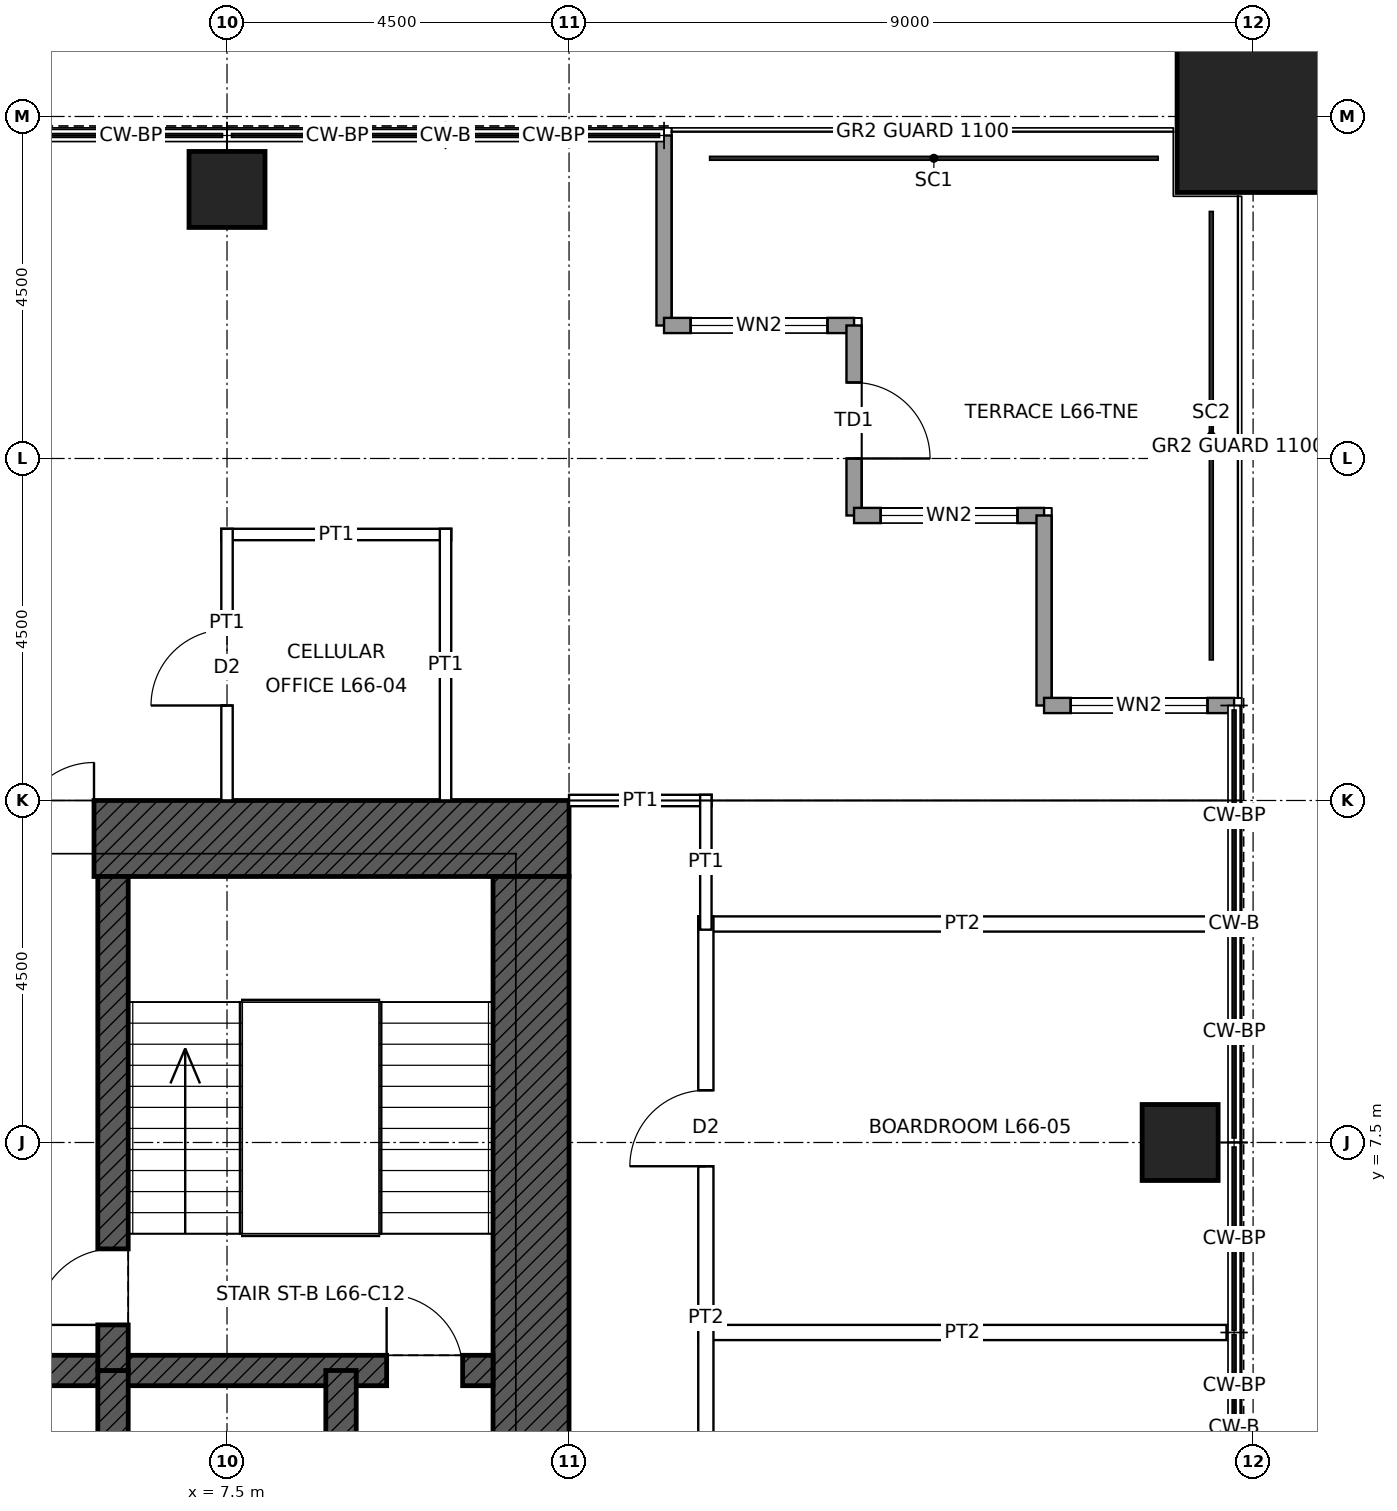
"""IFC4 building model, lengths in metres.
Left out: names, types, materials, properties, quantities, classifications, styles, units other than length and angle.
Written with IfcOpenShell. Run it as: python <this file> out.ifc"""

import sys

from ifc_helpers import new_model, si_unit, direction, frame, frame_2d, origin, origin_2d, place, context, subcontext, project, spatial, rectangle, hollow_rectangle, extrude, element, fill, save


model = new_model("IFC4")
c1 = context("Model", 3, precision=1e-05, world=origin(), true_north=direction((0.0, 1.0)))
c2 = subcontext(c1, "Body", "Model", "MODEL_VIEW")
j1 = project(units=[si_unit("LENGTHUNIT", "METRE"), si_unit("PLANEANGLEUNIT", "RADIAN")], contexts=[c1])
p1 = place(None, origin())
s1 = spatial("IfcSite", under=j1, at=p1, CompositionType="ELEMENT")
p2 = place(p1, origin())
s2 = spatial("IfcBuilding", under=s1, at=p2, CompositionType="ELEMENT")
p3 = place(p2, frame((0.0, 0.0, 299.9)))
s3 = spatial("IfcBuildingStorey", under=s2, at=p3, CompositionType="ELEMENT", Elevation=299.9)
p4 = place(p3, frame((21.0, 21.0, 0.0), z_axis=(0.0, 0.0, 1.0), x_axis=(1.0, 0.0, 0.0)))
e1 = element("IfcColumn", 1, at=p4, inside=s3, PredefinedType="COLUMN", context=c2, shape_type="SweptSolid", body=[
    extrude(hollow_rectangle(XDim=2.0, YDim=2.0, WallThickness=0.095, at=origin_2d()), origin(), (0.0, 0.0, 1.0), 4.0),
])
for number, where, z_axis, x_axis in (
    (2, (7.5, 20.04, 0.0), (0.0, 0.0, 1.0), (1.0, 0.0, 0.0)),
    (3, (20.04, 7.5, 0.0), (0.0, 0.0, 1.0), (1.0, 0.0, 0.0)),
):
    element("IfcColumn", number, at=place(p3, frame(where, z_axis=z_axis, x_axis=x_axis)), inside=s3, PredefinedType="COLUMN", context=c2, shape_type="SweptSolid", body=[
        extrude(hollow_rectangle(XDim=1.0, YDim=1.0, WallThickness=0.075, at=origin_2d()), origin(), (0.0, 0.0, 1.0), 4.0),
    ])
p5 = place(p3, frame((-12.0, 11.5, 0.0), z_axis=(0.0, 0.0, 1.0), x_axis=(1.0, 0.0, 0.0)))
e4 = element("IfcWall", 4, at=p5, inside=s3, PredefinedType="SHEAR", context=c2, shape_type="SweptSolid", body=[
    extrude(rectangle(XDim=24.0, YDim=1.0, at=frame_2d((12.0, 0.0))), origin(), (0.0, 0.0, 1.0), 4.0),
])
p6 = place(p5, frame((6.25, 0.0, 0.0)))
e5 = element("IfcOpeningElement", 5, at=p6, cuts=e4, PredefinedType="OPENING", context=c2, shape_type="SweptSolid", body=[
    extrude(rectangle(XDim=1.0, YDim=2.4, at=frame_2d((0.5, 1.2))), frame((0.0, 0.51, 0.0), z_axis=(0.0, -1.0, 0.0), x_axis=(1.0, 0.0, 0.0)), (0.0, 0.0, 1.0), 1.02),
])
p7 = place(p5, frame((16.75, 0.0, 0.0)))
e6 = element("IfcOpeningElement", 6, at=p7, cuts=e4, PredefinedType="OPENING", context=c2, shape_type="SweptSolid", body=[
    extrude(rectangle(XDim=1.0, YDim=2.4, at=frame_2d((0.5, 1.2))), frame((0.0, 0.51, 0.0), z_axis=(0.0, -1.0, 0.0), x_axis=(1.0, 0.0, 0.0)), (0.0, 0.0, 1.0), 1.02),
])
p8 = place(p3, frame((11.5, 11.0, 0.0), z_axis=(0.0, 0.0, 1.0), x_axis=(0.0, -1.0, 0.0)))
e7 = element("IfcWall", 7, at=p8, inside=s3, PredefinedType="SHEAR", context=c2, shape_type="SweptSolid", body=[
    extrude(rectangle(XDim=22.0, YDim=1.0, at=frame_2d((11.0, 0.0))), origin(), (0.0, 0.0, 1.0), 4.0),
])
p9 = place(p8, frame((10.5, 0.0, 0.0)))
e8 = element("IfcOpeningElement", 8, at=p9, cuts=e7, PredefinedType="OPENING", context=c2, shape_type="SweptSolid", body=[
    extrude(rectangle(XDim=1.0, YDim=2.4, at=frame_2d((0.5, 1.2))), frame((0.0, 0.51, 0.0), z_axis=(0.0, -1.0, 0.0), x_axis=(1.0, 0.0, 0.0)), (0.0, 0.0, 1.0), 1.02),
])
p10 = place(p3, frame((-11.0, 4.5, 0.0), z_axis=(0.0, 0.0, 1.0), x_axis=(1.0, 0.0, 0.0)))
e9 = element("IfcWall", 9, at=p10, inside=s3, PredefinedType="SHEAR", context=c2, shape_type="SweptSolid", body=[
    extrude(rectangle(XDim=22.0, YDim=0.4, at=frame_2d((11.0, 0.0))), origin(), (0.0, 0.0, 1.0), 4.0),
])
p11 = place(p10, frame((0.4, 0.0, 0.0)))
e10 = element("IfcOpeningElement", 10, at=p11, cuts=e9, PredefinedType="OPENING", context=c2, shape_type="SweptSolid", body=[
    extrude(rectangle(XDim=1.0, YDim=2.1, at=frame_2d((0.5, 1.05))), frame((0.0, 0.21, 0.0), z_axis=(0.0, -1.0, 0.0), x_axis=(1.0, 0.0, 0.0)), (0.0, 0.0, 1.0), 0.42),
])
p12 = place(p10, frame((20.6, 0.0, 0.0)))
e11 = element("IfcOpeningElement", 11, at=p12, cuts=e9, PredefinedType="OPENING", context=c2, shape_type="SweptSolid", body=[
    extrude(rectangle(XDim=1.0, YDim=2.1, at=frame_2d((0.5, 1.05))), frame((0.0, 0.21, 0.0), z_axis=(0.0, -1.0, 0.0), x_axis=(1.0, 0.0, 0.0)), (0.0, 0.0, 1.0), 0.42),
])
for number, where, z_axis, x_axis in (
    (12, (9.0, 1.5, 0.0), (0.0, 0.0, 1.0), (0.0, 1.0, 0.0)),
    (13, (6.0, 1.5, 0.0), (0.0, 0.0, 1.0), (0.0, 1.0, 0.0)),
):
    element("IfcWall", number, at=place(p3, frame(where, z_axis=z_axis, x_axis=x_axis)), inside=s3, PredefinedType="SHEAR", context=c2, shape_type="SweptSolid", body=[
        extrude(rectangle(XDim=3.0, YDim=0.4, at=frame_2d((1.5, 0.0))), origin(), (0.0, 0.0, 1.0), 4.0),
    ])
p13 = place(p3, frame((6.0, 4.5, 0.0), z_axis=(0.0, 0.0, 1.0), x_axis=(0.0, 1.0, 0.0)))
e14 = element("IfcWall", 14, at=p13, inside=s3, PredefinedType="SHEAR", context=c2, shape_type="SweptSolid", body=[
    extrude(rectangle(XDim=6.5, YDim=0.4, at=frame_2d((3.25, 0.0))), origin(), (0.0, 0.0, 1.0), 4.0),
])
p14 = place(p13, frame((0.6, 0.0, 0.0)))
e15 = element("IfcOpeningElement", 15, at=p14, cuts=e14, PredefinedType="OPENING", context=c2, shape_type="SweptSolid", body=[
    extrude(rectangle(XDim=1.0, YDim=2.1, at=frame_2d((0.5, 1.05))), frame((0.0, 0.21, 0.0), z_axis=(0.0, -1.0, 0.0), x_axis=(1.0, 0.0, 0.0)), (0.0, 0.0, 1.0), 0.42),
])
p15 = place(p3, frame((13.25, 20.75, 0.0), z_axis=(0.0, 0.0, 1.0), x_axis=(0.0, -1.0, 0.0)))
e16 = element("IfcWall", 16, at=p15, inside=s3, PredefinedType="SOLIDWALL", context=c2, shape_type="SweptSolid", body=[
    extrude(rectangle(XDim=2.5, YDim=0.2, at=frame_2d((1.25, 0.0))), origin(), (0.0, 0.0, 1.0), 3.85),
])
p16 = place(p3, frame((13.25, 18.25, 0.0), z_axis=(0.0, 0.0, 1.0), x_axis=(1.0, 0.0, 0.0)))
e17 = element("IfcWall", 17, at=p16, inside=s3, PredefinedType="SOLIDWALL", context=c2, shape_type="SweptSolid", body=[
    extrude(rectangle(XDim=2.5, YDim=0.2, at=frame_2d((1.25, 0.0))), origin(), (0.0, 0.0, 1.0), 3.85),
])
p17 = place(p16, frame((0.35, 0.0, 0.3)))
e18 = element("IfcOpeningElement", 18, at=p17, cuts=e17, PredefinedType="OPENING", context=c2, shape_type="SweptSolid", body=[
    extrude(rectangle(XDim=1.8, YDim=2.4, at=frame_2d((0.9, 1.2))), frame((0.0, 0.11, 0.0), z_axis=(0.0, -1.0, 0.0), x_axis=(1.0, 0.0, 0.0)), (0.0, 0.0, 1.0), 0.22),
])
p18 = place(p3, frame((15.75, 18.25, 0.0), z_axis=(0.0, 0.0, 1.0), x_axis=(0.0, -1.0, 0.0)))
e19 = element("IfcWall", 19, at=p18, inside=s3, PredefinedType="SOLIDWALL", context=c2, shape_type="SweptSolid", body=[
    extrude(rectangle(XDim=2.5, YDim=0.2, at=frame_2d((1.25, 0.0))), origin(), (0.0, 0.0, 1.0), 3.317),
])
p19 = place(p18, frame((0.75, 0.0, 0.0)))
e20 = element("IfcOpeningElement", 20, at=p19, cuts=e19, PredefinedType="OPENING", context=c2, shape_type="SweptSolid", body=[
    extrude(rectangle(XDim=1.0, YDim=2.4, at=frame_2d((0.5, 1.2))), frame((0.0, 0.11, 0.0), z_axis=(0.0, -1.0, 0.0), x_axis=(1.0, 0.0, 0.0)), (0.0, 0.0, 1.0), 0.22),
])
p20 = place(p3, frame((15.75, 15.75, 0.0), z_axis=(0.0, 0.0, 1.0), x_axis=(1.0, 0.0, 0.0)))
e21 = element("IfcWall", 21, at=p20, inside=s3, PredefinedType="SOLIDWALL", context=c2, shape_type="SweptSolid", body=[
    extrude(rectangle(XDim=2.5, YDim=0.2, at=frame_2d((1.25, 0.0))), origin(), (0.0, 0.0, 1.0), 3.85),
])
p21 = place(p20, frame((0.35, 0.0, 0.3)))
e22 = element("IfcOpeningElement", 22, at=p21, cuts=e21, PredefinedType="OPENING", context=c2, shape_type="SweptSolid", body=[
    extrude(rectangle(XDim=1.8, YDim=2.4, at=frame_2d((0.9, 1.2))), frame((0.0, 0.11, 0.0), z_axis=(0.0, -1.0, 0.0), x_axis=(1.0, 0.0, 0.0)), (0.0, 0.0, 1.0), 0.22),
])
p22 = place(p3, frame((18.25, 15.75, 0.0), z_axis=(0.0, 0.0, 1.0), x_axis=(0.0, -1.0, 0.0)))
e23 = element("IfcWall", 23, at=p22, inside=s3, PredefinedType="SOLIDWALL", context=c2, shape_type="SweptSolid", body=[
    extrude(rectangle(XDim=2.5, YDim=0.2, at=frame_2d((1.25, 0.0))), origin(), (0.0, 0.0, 1.0), 3.85),
])
p23 = place(p3, frame((18.25, 13.25, 0.0), z_axis=(0.0, 0.0, 1.0), x_axis=(1.0, 0.0, 0.0)))
e24 = element("IfcWall", 24, at=p23, inside=s3, PredefinedType="SOLIDWALL", context=c2, shape_type="SweptSolid", body=[
    extrude(rectangle(XDim=2.5, YDim=0.2, at=frame_2d((1.25, 0.0))), origin(), (0.0, 0.0, 1.0), 3.85),
])
p24 = place(p23, frame((0.35, 0.0, 0.3)))
e25 = element("IfcOpeningElement", 25, at=p24, cuts=e24, PredefinedType="OPENING", context=c2, shape_type="SweptSolid", body=[
    extrude(rectangle(XDim=1.8, YDim=2.4, at=frame_2d((0.9, 1.2))), frame((0.0, 0.11, 0.0), z_axis=(0.0, -1.0, 0.0), x_axis=(1.0, 0.0, 0.0)), (0.0, 0.0, 1.0), 0.22),
])
for number, where, z_axis, x_axis in (
    (26, (13.7, 5.0, 0.0), (0.0, 0.0, 1.0), (1.0, 0.0, 0.0)),
    (27, (13.7, 10.375, 0.0), (0.0, 0.0, 1.0), (1.0, 0.0, 0.0)),
):
    element("IfcWall", number, at=place(p3, frame(where, z_axis=z_axis, x_axis=x_axis)), inside=s3, PredefinedType="PARTITIONING", context=c2, shape_type="SweptSolid", body=[
        extrude(rectangle(XDim=6.95, YDim=0.2, at=frame_2d((3.475, 0.0))), origin(), (0.0, 0.0, 1.0), 3.85),
    ])
p25 = place(p3, frame((12.0, 12.0, 0.0), z_axis=(0.0, 0.0, 1.0), x_axis=(1.0, 0.0, 0.0)))
e28 = element("IfcWall", 28, at=p25, inside=s3, PredefinedType="PARTITIONING", context=c2, shape_type="SweptSolid", body=[
    extrude(rectangle(XDim=1.875, YDim=0.15, at=frame_2d((0.938, 0.0))), origin(), (0.0, 0.0, 1.0), 3.01),
])
p26 = place(p3, frame((7.425, 15.5, 0.0), z_axis=(0.0, 0.0, 1.0), x_axis=(1.0, 0.0, 0.0)))
e29 = element("IfcWall", 29, at=p26, inside=s3, PredefinedType="PARTITIONING", context=c2, shape_type="SweptSolid", body=[
    extrude(rectangle(XDim=3.025, YDim=0.15, at=frame_2d((1.512, 0.0))), origin(), (0.0, 0.0, 1.0), 3.85),
])
p27 = place(p3, frame((7.5, 12.0, 0.0), z_axis=(0.0, 0.0, 1.0), x_axis=(0.0, 1.0, 0.0)))
e30 = element("IfcWall", 30, at=p27, inside=s3, PredefinedType="PARTITIONING", context=c2, shape_type="SweptSolid", body=[
    extrude(rectangle(XDim=3.575, YDim=0.15, at=frame_2d((1.788, 0.0))), origin(), (0.0, 0.0, 1.0), 3.243),
])
p28 = place(p27, frame((1.25, 0.0, 0.0)))
e31 = element("IfcOpeningElement", 31, at=p28, cuts=e30, PredefinedType="OPENING", context=c2, shape_type="SweptSolid", body=[
    extrude(rectangle(XDim=1.0, YDim=2.1, at=frame_2d((0.5, 1.05))), frame((0.0, 0.085, 0.0), z_axis=(0.0, -1.0, 0.0), x_axis=(1.0, 0.0, 0.0)), (0.0, 0.0, 1.0), 0.17),
])
p29 = place(p3, frame((10.375, 12.0, 0.0), z_axis=(0.0, 0.0, 1.0), x_axis=(0.0, 1.0, 0.0)))
e32 = element("IfcWall", 32, at=p29, inside=s3, PredefinedType="PARTITIONING", context=c2, shape_type="SweptSolid", body=[
    extrude(rectangle(XDim=3.575, YDim=0.15, at=frame_2d((1.788, 0.0))), origin(), (0.0, 0.0, 1.0), 3.85),
])
p30 = place(p3, frame((13.8, -0.1, 0.0), z_axis=(0.0, 0.0, 1.0), x_axis=(0.0, 1.0, 0.0)))
e33 = element("IfcWall", 33, at=p30, inside=s3, PredefinedType="PARTITIONING", context=c2, shape_type="SweptSolid", body=[
    extrude(rectangle(XDim=10.575, YDim=0.2, at=frame_2d((5.288, 0.0))), origin(), (0.0, 0.0, 1.0), 3.85),
])
p31 = place(p30, frame((7.288, 0.0, 0.0)))
e34 = element("IfcOpeningElement", 34, at=p31, cuts=e33, PredefinedType="OPENING", context=c2, shape_type="SweptSolid", body=[
    extrude(rectangle(XDim=1.0, YDim=2.1, at=frame_2d((0.5, 1.05))), frame((0.0, 0.11, 0.0), z_axis=(0.0, -1.0, 0.0), x_axis=(1.0, 0.0, 0.0)), (0.0, 0.0, 1.0), 0.22),
])
p32 = place(p30, frame((2.1, 0.0, 0.0)))
e35 = element("IfcOpeningElement", 35, at=p32, cuts=e33, PredefinedType="OPENING", context=c2, shape_type="SweptSolid", body=[
    extrude(rectangle(XDim=1.0, YDim=2.1, at=frame_2d((0.5, 1.05))), frame((0.0, 0.11, 0.0), z_axis=(0.0, -1.0, 0.0), x_axis=(1.0, 0.0, 0.0)), (0.0, 0.0, 1.0), 0.22),
])
p33 = place(p3, frame((13.8, 10.3, 0.0), z_axis=(0.0, 0.0, 1.0), x_axis=(0.0, 1.0, 0.0)))
e36 = element("IfcWall", 36, at=p33, inside=s3, PredefinedType="PARTITIONING", context=c2, shape_type="SweptSolid", body=[
    extrude(rectangle(XDim=1.775, YDim=0.15, at=frame_2d((0.887, 0.0))), origin(), (0.0, 0.0, 1.0), 3.85),
])
p34 = place(p17, origin())
e37 = element("IfcWindow", 37, at=p34, inside=s3, PartitioningType="SINGLE_PANEL", PredefinedType="WINDOW", context=c2, shape_type="SweptSolid", body=[
    extrude(rectangle(XDim=1.8, YDim=2.4, at=frame_2d((0.9, 1.2))), frame((0.0, 0.03, 0.0), z_axis=(0.0, -1.0, 0.0), x_axis=(1.0, 0.0, 0.0)), (0.0, 0.0, 1.0), 0.06),
])
fill(e18, e37)
p35 = place(p19, origin())
e38 = element("IfcDoor", 38, at=p35, inside=s3, OperationType="SINGLE_SWING_RIGHT", PredefinedType="DOOR", context=c2, shape_type="SweptSolid", body=[
    extrude(rectangle(XDim=1.0, YDim=2.4, at=frame_2d((0.5, 1.2))), frame((0.0, 0.025, 0.0), z_axis=(0.0, -1.0, 0.0), x_axis=(1.0, 0.0, 0.0)), (0.0, 0.0, 1.0), 0.05),
])
fill(e20, e38)
p36 = place(p21, origin())
e39 = element("IfcWindow", 39, at=p36, inside=s3, PartitioningType="SINGLE_PANEL", PredefinedType="WINDOW", context=c2, shape_type="SweptSolid", body=[
    extrude(rectangle(XDim=1.8, YDim=2.4, at=frame_2d((0.9, 1.2))), frame((0.0, 0.03, 0.0), z_axis=(0.0, -1.0, 0.0), x_axis=(1.0, 0.0, 0.0)), (0.0, 0.0, 1.0), 0.06),
])
fill(e22, e39)
p37 = place(p24, origin())
e40 = element("IfcWindow", 40, at=p37, inside=s3, PartitioningType="SINGLE_PANEL", PredefinedType="WINDOW", context=c2, shape_type="SweptSolid", body=[
    extrude(rectangle(XDim=1.8, YDim=2.4, at=frame_2d((0.9, 1.2))), frame((0.0, 0.03, 0.0), z_axis=(0.0, -1.0, 0.0), x_axis=(1.0, 0.0, 0.0)), (0.0, 0.0, 1.0), 0.06),
])
fill(e25, e40)
p38 = place(p12, origin())
e41 = element("IfcDoor", 41, at=p38, inside=s3, OperationType="SINGLE_SWING_LEFT", PredefinedType="DOOR", context=c2, shape_type="SweptSolid", body=[
    extrude(rectangle(XDim=1.0, YDim=2.1, at=frame_2d((0.5, 1.05))), frame((0.0, 0.025, 0.0), z_axis=(0.0, -1.0, 0.0), x_axis=(1.0, 0.0, 0.0)), (0.0, 0.0, 1.0), 0.05),
])
fill(e11, e41)
p39 = place(p14, origin())
e42 = element("IfcDoor", 42, at=p39, inside=s3, OperationType="SINGLE_SWING_LEFT", PredefinedType="DOOR", context=c2, shape_type="SweptSolid", body=[
    extrude(rectangle(XDim=1.0, YDim=2.1, at=frame_2d((0.5, 1.05))), frame((0.0, 0.025, 0.0), z_axis=(0.0, -1.0, 0.0), x_axis=(1.0, 0.0, 0.0)), (0.0, 0.0, 1.0), 0.05),
])
fill(e15, e42)
p40 = place(p7, origin())
e43 = element("IfcDoor", 43, at=p40, inside=s3, OperationType="SINGLE_SWING_RIGHT", PredefinedType="DOOR", context=c2, shape_type="SweptSolid", body=[
    extrude(rectangle(XDim=1.0, YDim=2.4, at=frame_2d((0.5, 1.2))), frame((0.0, 0.485, 0.0), z_axis=(0.0, -1.0, 0.0), x_axis=(1.0, 0.0, 0.0)), (0.0, 0.0, 1.0), 0.05),
])
fill(e6, e43)
p41 = place(p28, origin())
e44 = element("IfcDoor", 44, at=p41, inside=s3, OperationType="SINGLE_SWING_LEFT", PredefinedType="DOOR", context=c2, shape_type="SweptSolid", body=[
    extrude(rectangle(XDim=1.0, YDim=2.1, at=frame_2d((0.5, 1.05))), frame((0.0, 0.025, 0.0), z_axis=(0.0, -1.0, 0.0), x_axis=(1.0, 0.0, 0.0)), (0.0, 0.0, 1.0), 0.05),
])
fill(e31, e44)
p42 = place(p31, origin())
e45 = element("IfcDoor", 45, at=p42, inside=s3, OperationType="SINGLE_SWING_LEFT", PredefinedType="DOOR", context=c2, shape_type="SweptSolid", body=[
    extrude(rectangle(XDim=1.0, YDim=2.1, at=frame_2d((0.5, 1.05))), frame((0.0, 0.025, 0.0), z_axis=(0.0, -1.0, 0.0), x_axis=(1.0, 0.0, 0.0)), (0.0, 0.0, 1.0), 0.05),
])
fill(e34, e45)
save(model, sys.argv[1])
